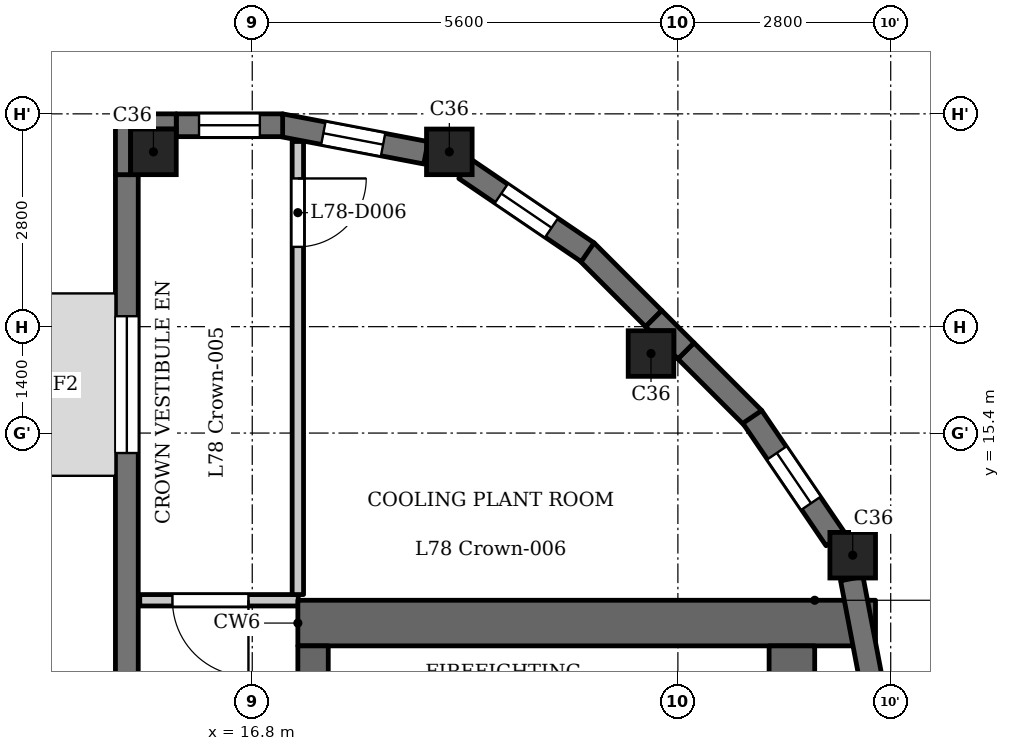
"""IFC4 building model, lengths in metres.
Left out: names, types, materials, properties, quantities, classifications, styles, units other than length and angle.
Written with IfcOpenShell. Run it as: python <this file> out.ifc"""

import sys

from ifc_helpers import new_model, si_unit, direction, frame, frame_2d, origin, origin_2d, place, context, subcontext, project, spatial, polyline, rectangle, outline, extrude, element, fill, save


model = new_model("IFC4")
c1 = context("Model", 3, precision=1e-05, world=origin(), true_north=direction((0.0, 1.0)))
c2 = subcontext(c1, "Body", "Model", "MODEL_VIEW")
j1 = project(units=[si_unit("LENGTHUNIT", "METRE"), si_unit("PLANEANGLEUNIT", "RADIAN")], contexts=[c1])
p1 = place(None, origin())
s1 = spatial("IfcSite", under=j1, at=p1, CompositionType="ELEMENT")
p2 = place(p1, origin())
s2 = spatial("IfcBuilding", under=s1, at=p2, CompositionType="ELEMENT")
p3 = place(p2, frame((0.0, 0.0, 303.4)))
s3 = spatial("IfcBuildingStorey", under=s2, at=p3, CompositionType="ELEMENT", Elevation=303.4)
for number, where, z_axis, x_axis in (
    (1, (15.5, 19.1, 0.0), (0.0, 0.0, 1.0), (1.0, 0.0, 0.0)),
    (2, (19.393, 19.1, 0.0), (0.0, 0.0, 1.0), (1.0, 0.0, 0.0)),
    (3, (22.046, 16.446, 0.0), (0.0, 0.0, 1.0), (1.0, 0.0, 0.0)),
    (4, (24.7, 13.793, 0.0), (0.0, 0.0, 1.0), (1.0, 0.0, 0.0)),
):
    element("IfcColumn", number, at=place(p3, frame(where, z_axis=z_axis, x_axis=x_axis)), inside=s3, PredefinedType="COLUMN", context=c2, shape_type="SweptSolid", body=[
        extrude(rectangle(XDim=0.6, YDim=0.6, at=origin_2d()), origin(), (0.0, 0.0, 1.0), 3.5),
    ])
p4 = place(p3, frame((15.15, 18.8, 0.0), z_axis=(0.0, 0.0, 1.0), x_axis=(0.0, -1.0, 0.0)))
e5 = element("IfcWall", 5, at=p4, inside=s3, PredefinedType="SOLIDWALL", context=c2, shape_type="SweptSolid", body=[
    extrude(rectangle(XDim=7.3, YDim=0.3, at=frame_2d((3.65, 0.0))), origin(), (0.0, 0.0, 1.0), 3.2),
])
p5 = place(p4, frame((1.863, 0.0, 0.9)))
e6 = element("IfcOpeningElement", 6, at=p5, cuts=e5, PredefinedType="OPENING", context=c2, shape_type="SweptSolid", body=[
    extrude(rectangle(XDim=1.8, YDim=1.25, at=frame_2d((0.9, 0.625))), frame((0.0, 0.16, 0.0), z_axis=(0.0, -1.0, 0.0), x_axis=(1.0, 0.0, 0.0)), (0.0, 0.0, 1.0), 0.32),
])
p6 = place(p3, frame((25.052, 11.573, 0.0), z_axis=(0.0, 0.0, 1.0), x_axis=(-0.187354129902, 0.982292436095, 0.0)))
e7 = element("IfcWall", 7, at=p6, inside=s3, PredefinedType="SOLIDWALL", context=c2, shape_type="SweptSolid", body=[
    extrude(rectangle(XDim=1.947, YDim=0.3, at=frame_2d((0.973, 0.0))), origin(), (0.0, 0.0, 1.0), 2.6),
])
p7 = place(p3, frame((24.474, 14.002, 0.0), z_axis=(0.0, 0.0, 1.0), x_axis=(-0.562025435703, 0.827119948752, 0.0)))
e8 = element("IfcWall", 8, at=p7, inside=s3, PredefinedType="SOLIDWALL", context=c2, shape_type="SweptSolid", body=[
    extrude(rectangle(XDim=1.948, YDim=0.3, at=frame_2d((0.974, 0.0))), origin(), (0.0, 0.0, 1.0), 2.6),
])
p8 = place(p7, frame((0.574, 0.0, 0.6)))
e9 = element("IfcOpeningElement", 9, at=p8, cuts=e8, PredefinedType="OPENING", context=c2, shape_type="SweptSolid", body=[
    extrude(rectangle(XDim=0.8, YDim=1.55, at=frame_2d((0.4, 0.775))), frame((0.0, 0.16, 0.0), z_axis=(0.0, -1.0, 0.0), x_axis=(1.0, 0.0, 0.0)), (0.0, 0.0, 1.0), 0.32),
])
for number, where, z_axis, x_axis in (
    (10, (23.397, 15.591, 0.0), (0.0, 0.0, 1.0), (-0.707, 0.707, 0.0)),
    (11, (22.082, 16.906, 0.0), (0.0, 0.0, 1.0), (-0.707, 0.707, 0.0)),
):
    element("IfcWall", number, at=place(p3, frame(where, z_axis=z_axis, x_axis=x_axis)), inside=s3, PredefinedType="SOLIDWALL", context=c2, shape_type="SweptSolid", body=[
        extrude(rectangle(XDim=1.26, YDim=0.3, at=frame_2d((0.63, 0.0))), origin(), (0.0, 0.0, 1.0), 3.2),
    ])
p9 = place(p3, frame((21.213, 17.779, 0.0), z_axis=(0.0, 0.0, 1.0), x_axis=(-0.827022075481, 0.562169446579, 0.0)))
e12 = element("IfcWall", 12, at=p9, inside=s3, PredefinedType="SOLIDWALL", context=c2, shape_type="SweptSolid", body=[
    extrude(rectangle(XDim=1.948, YDim=0.3, at=frame_2d((0.974, 0.0))), origin(), (0.0, 0.0, 1.0), 2.6),
])
p10 = place(p9, frame((0.574, 0.0, 0.6)))
e13 = element("IfcOpeningElement", 13, at=p10, cuts=e12, PredefinedType="OPENING", context=c2, shape_type="SweptSolid", body=[
    extrude(rectangle(XDim=0.8, YDim=1.55, at=frame_2d((0.4, 0.775))), frame((0.0, 0.16, 0.0), z_axis=(0.0, -1.0, 0.0), x_axis=(1.0, 0.0, 0.0)), (0.0, 0.0, 1.0), 0.32),
])
p11 = place(p3, frame((19.085, 19.088, 0.0), z_axis=(0.0, 0.0, 1.0), x_axis=(-0.982286967073, 0.187382801553, 0.0)))
e14 = element("IfcWall", 14, at=p11, inside=s3, PredefinedType="SOLIDWALL", context=c2, shape_type="SweptSolid", body=[
    extrude(rectangle(XDim=1.948, YDim=0.3, at=frame_2d((0.974, 0.0))), origin(), (0.0, 0.0, 1.0), 2.6),
])
p12 = place(p11, frame((0.574, 0.0, 0.6)))
e15 = element("IfcOpeningElement", 15, at=p12, cuts=e14, PredefinedType="OPENING", context=c2, shape_type="SweptSolid", body=[
    extrude(rectangle(XDim=0.8, YDim=1.55, at=frame_2d((0.4, 0.775))), frame((0.0, 0.16, 0.0), z_axis=(0.0, -1.0, 0.0), x_axis=(1.0, 0.0, 0.0)), (0.0, 0.0, 1.0), 0.32),
])
p13 = place(p3, frame((17.2, 19.45, 0.0), z_axis=(0.0, 0.0, 1.0), x_axis=(-1.0, 0.0, 0.0)))
e16 = element("IfcWall", 16, at=p13, inside=s3, PredefinedType="SOLIDWALL", context=c2, shape_type="SweptSolid", body=[
    extrude(rectangle(XDim=1.4, YDim=0.3, at=frame_2d((0.7, 0.0))), origin(), (0.0, 0.0, 1.0), 3.2),
])
p14 = place(p13, frame((0.3, 0.0, 0.6)))
e17 = element("IfcOpeningElement", 17, at=p14, cuts=e16, PredefinedType="OPENING", context=c2, shape_type="SweptSolid", body=[
    extrude(rectangle(XDim=0.8, YDim=1.55, at=frame_2d((0.4, 0.775))), frame((0.0, 0.16, 0.0), z_axis=(0.0, -1.0, 0.0), x_axis=(1.0, 0.0, 0.0)), (0.0, 0.0, 1.0), 0.32),
])
p15 = place(p3, frame((17.4, 12.9, 0.0), z_axis=(0.0, 0.0, 1.0), x_axis=(1.0, 0.0, 0.0)))
e18 = element("IfcWall", 18, at=p15, inside=s3, PredefinedType="SHEAR", context=c2, shape_type="SweptSolid", body=[
    extrude(rectangle(XDim=7.6, YDim=0.6, at=frame_2d((3.8, 0.0))), origin(), (0.0, 0.0, 1.0), 3.2),
])
p16 = place(p3, frame((17.6, -12.6, 0.0), z_axis=(0.0, 0.0, 1.0), x_axis=(0.0, 1.0, 0.0)))
e19 = element("IfcWall", 19, at=p16, inside=s3, PredefinedType="SHEAR", context=c2, shape_type="SweptSolid", body=[
    extrude(rectangle(XDim=25.2, YDim=0.4, at=frame_2d((12.6, 0.0))), origin(), (0.0, 0.0, 1.0), 3.2),
])
p17 = place(p16, frame((8.8, 0.0, 0.0)))
e20 = element("IfcOpeningElement", 20, at=p17, cuts=e19, PredefinedType="OPENING", context=c2, shape_type="SweptSolid", body=[
    extrude(rectangle(XDim=0.9, YDim=2.1, at=frame_2d((0.45, 1.05))), frame((0.0, 0.21, 0.0), z_axis=(0.0, -1.0, 0.0), x_axis=(1.0, 0.0, 0.0)), (0.0, 0.0, 1.0), 0.42),
])
p18 = place(p16, frame((17.05, 0.0, 0.0)))
e21 = element("IfcOpeningElement", 21, at=p18, cuts=e19, PredefinedType="OPENING", context=c2, shape_type="SweptSolid", body=[
    extrude(rectangle(XDim=0.9, YDim=2.1, at=frame_2d((0.45, 1.05))), frame((0.0, 0.21, 0.0), z_axis=(0.0, -1.0, 0.0), x_axis=(1.0, 0.0, 0.0)), (0.0, 0.0, 1.0), 0.42),
])
p19 = place(p16, frame((23.25, 0.0, 0.0)))
e22 = element("IfcOpeningElement", 22, at=p19, cuts=e19, PredefinedType="OPENING", context=c2, shape_type="SweptSolid", body=[
    extrude(rectangle(XDim=1.1, YDim=2.1, at=frame_2d((0.55, 1.05))), frame((0.0, 0.21, 0.0), z_axis=(0.0, -1.0, 0.0), x_axis=(1.0, 0.0, 0.0)), (0.0, 0.0, 1.0), 0.42),
])
p20 = place(p16, frame((0.85, 0.0, 0.0)))
e23 = element("IfcOpeningElement", 23, at=p20, cuts=e19, PredefinedType="OPENING", context=c2, shape_type="SweptSolid", body=[
    extrude(rectangle(XDim=1.1, YDim=2.1, at=frame_2d((0.55, 1.05))), frame((0.0, 0.21, 0.0), z_axis=(0.0, -1.0, 0.0), x_axis=(1.0, 0.0, 0.0)), (0.0, 0.0, 1.0), 0.42),
])
p21 = place(p16, frame((13.075, 0.0, 0.0)))
e24 = element("IfcOpeningElement", 24, at=p21, cuts=e19, PredefinedType="OPENING", context=c2, shape_type="SweptSolid", body=[
    extrude(rectangle(XDim=1.8, YDim=2.1, at=frame_2d((0.9, 1.05))), frame((0.0, 0.21, 0.0), z_axis=(0.0, -1.0, 0.0), x_axis=(1.0, 0.0, 0.0)), (0.0, 0.0, 1.0), 0.42),
])
p22 = place(p3, frame((23.9, -12.6, 0.0), z_axis=(0.0, 0.0, 1.0), x_axis=(0.0, 1.0, 0.0)))
e25 = element("IfcWall", 25, at=p22, inside=s3, PredefinedType="SHEAR", context=c2, shape_type="SweptSolid", body=[
    extrude(rectangle(XDim=25.2, YDim=0.6, at=frame_2d((12.6, 0.0))), origin(), (0.0, 0.0, 1.0), 3.2),
])
p23 = place(p3, frame((15.32, 13.2, 0.0), z_axis=(0.0, 0.0, 1.0), x_axis=(1.0, 0.0, 0.0)))
e26 = element("IfcWall", 26, at=p23, inside=s3, PredefinedType="PARTITIONING", context=c2, shape_type="SweptSolid", body=[
    extrude(rectangle(XDim=2.085, YDim=0.15, at=frame_2d((1.042, 0.0))), origin(), (0.0, 0.0, 1.0), 3.2),
])
p24 = place(p23, frame((0.43, 0.0, 0.0)))
e27 = element("IfcOpeningElement", 27, at=p24, cuts=e26, PredefinedType="OPENING", context=c2, shape_type="SweptSolid", body=[
    extrude(rectangle(XDim=1.0, YDim=2.1, at=frame_2d((0.5, 1.05))), frame((0.0, 0.085, 0.0), z_axis=(0.0, -1.0, 0.0), x_axis=(1.0, 0.0, 0.0)), (0.0, 0.0, 1.0), 0.17),
])
p25 = place(p3, frame((17.4, 13.275, 0.0), z_axis=(0.0, 0.0, 1.0), x_axis=(0.0, 1.0, 0.0)))
e28 = element("IfcWall", 28, at=p25, inside=s3, PredefinedType="PARTITIONING", context=c2, shape_type="SweptSolid", body=[
    extrude(rectangle(XDim=5.961, YDim=0.15, at=frame_2d((2.981, 0.0))), origin(), (0.0, 0.0, 1.0), 3.2),
])
p26 = place(p25, frame((4.575, 0.0, 0.0)))
e29 = element("IfcOpeningElement", 29, at=p26, cuts=e28, PredefinedType="OPENING", context=c2, shape_type="SweptSolid", body=[
    extrude(rectangle(XDim=0.9, YDim=2.1, at=frame_2d((0.45, 1.05))), frame((0.0, 0.085, 0.0), z_axis=(0.0, -1.0, 0.0), x_axis=(1.0, 0.0, 0.0)), (0.0, 0.0, 1.0), 0.17),
])
p27 = place(p3, origin())
e30 = element("IfcWall", 30, at=p27, inside=s3, PredefinedType="SOLIDWALL", context=c2, shape_type="SweptSolid", body=[
    extrude(outline(polyline([(22.4, 16.376), (22.612, 16.588), (22.188, 17.012), (21.976, 16.8), (22.029, 16.746), (22.346, 16.746), (22.346, 16.429), (22.4, 16.376)])), origin(), (0.0, 0.0, 1.0), 3.2),
])
e31 = element("IfcWall", 31, at=p27, inside=s3, PredefinedType="SOLIDWALL", context=c2, shape_type="SweptSolid", body=[
    extrude(outline(polyline([(15.8, 19.6), (15.0, 19.6), (15.0, 18.8), (15.2, 18.8), (15.2, 19.4), (15.8, 19.4), (15.8, 19.6)])), origin(), (0.0, 0.0, 1.0), 3.2),
])
p28 = place(p24, origin())
e32 = element("IfcDoor", 32, at=p28, inside=s3, OperationType="SINGLE_SWING_RIGHT", PredefinedType="DOOR", context=c2, shape_type="SweptSolid", body=[
    extrude(rectangle(XDim=1.0, YDim=2.1, at=frame_2d((0.5, 1.05))), frame((0.0, 0.025, 0.0), z_axis=(0.0, -1.0, 0.0), x_axis=(1.0, 0.0, 0.0)), (0.0, 0.0, 1.0), 0.05),
])
fill(e27, e32)
p29 = place(p26, origin())
e33 = element("IfcDoor", 33, at=p29, inside=s3, OperationType="SINGLE_SWING_RIGHT", PredefinedType="DOOR", context=c2, shape_type="SweptSolid", body=[
    extrude(rectangle(XDim=0.9, YDim=2.1, at=frame_2d((0.45, 1.05))), frame((0.0, 0.025, 0.0), z_axis=(0.0, -1.0, 0.0), x_axis=(1.0, 0.0, 0.0)), (0.0, 0.0, 1.0), 0.05),
])
fill(e29, e33)
p30 = place(p5, origin())
e34 = element("IfcWindow", 34, at=p30, inside=s3, PartitioningType="SINGLE_PANEL", PredefinedType="WINDOW", context=c2, shape_type="SweptSolid", body=[
    extrude(rectangle(XDim=1.8, YDim=1.25, at=frame_2d((0.9, 0.625))), frame((0.0, 0.03, 0.0), z_axis=(0.0, -1.0, 0.0), x_axis=(1.0, 0.0, 0.0)), (0.0, 0.0, 1.0), 0.06),
])
fill(e6, e34)
p31 = place(p8, origin())
e35 = element("IfcWindow", 35, at=p31, inside=s3, PartitioningType="SINGLE_PANEL", PredefinedType="WINDOW", context=c2, shape_type="SweptSolid", body=[
    extrude(rectangle(XDim=0.8, YDim=1.55, at=frame_2d((0.4, 0.775))), frame((0.0, 0.03, 0.0), z_axis=(0.0, -1.0, 0.0), x_axis=(1.0, 0.0, 0.0)), (0.0, 0.0, 1.0), 0.06),
])
fill(e9, e35)
p32 = place(p10, origin())
e36 = element("IfcWindow", 36, at=p32, inside=s3, PartitioningType="SINGLE_PANEL", PredefinedType="WINDOW", context=c2, shape_type="SweptSolid", body=[
    extrude(rectangle(XDim=0.8, YDim=1.55, at=frame_2d((0.4, 0.775))), frame((0.0, 0.03, 0.0), z_axis=(0.0, -1.0, 0.0), x_axis=(1.0, 0.0, 0.0)), (0.0, 0.0, 1.0), 0.06),
])
fill(e13, e36)
p33 = place(p12, origin())
e37 = element("IfcWindow", 37, at=p33, inside=s3, PartitioningType="SINGLE_PANEL", PredefinedType="WINDOW", context=c2, shape_type="SweptSolid", body=[
    extrude(rectangle(XDim=0.8, YDim=1.55, at=frame_2d((0.4, 0.775))), frame((0.0, 0.03, 0.0), z_axis=(0.0, -1.0, 0.0), x_axis=(1.0, 0.0, 0.0)), (0.0, 0.0, 1.0), 0.06),
])
fill(e15, e37)
p34 = place(p14, origin())
e38 = element("IfcWindow", 38, at=p34, inside=s3, PartitioningType="SINGLE_PANEL", PredefinedType="WINDOW", context=c2, shape_type="SweptSolid", body=[
    extrude(rectangle(XDim=0.8, YDim=1.55, at=frame_2d((0.4, 0.775))), frame((0.0, 0.03, 0.0), z_axis=(0.0, -1.0, 0.0), x_axis=(1.0, 0.0, 0.0)), (0.0, 0.0, 1.0), 0.06),
])
fill(e17, e38)
save(model, sys.argv[1])
